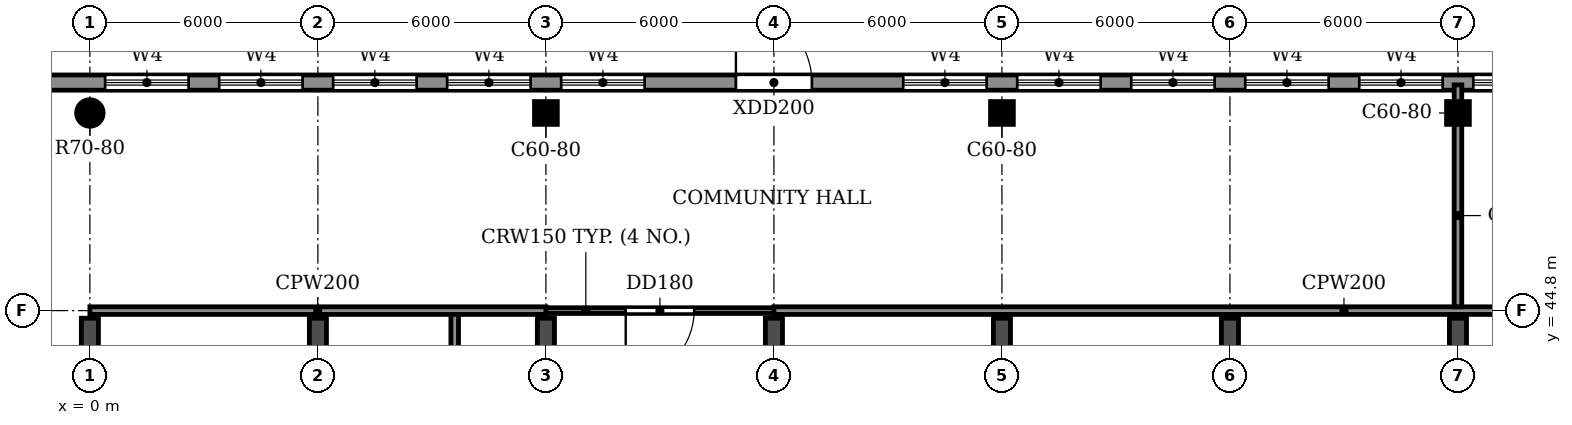
"""IFC4 building model, lengths in metres.
Left out: names, types, materials, properties, quantities, classifications, styles, units other than length and angle.
Written with IfcOpenShell. Run it as: python <this file> out.ifc"""

import sys

from ifc_helpers import new_model, si_unit, direction, frame, frame_2d, origin, origin_2d, place, context, subcontext, project, spatial, rectangle, circle, extrude, source, transform, mapped, element, fill, save


model = new_model("IFC4")
c1 = context("Model", 3, precision=1e-05, world=origin(), true_north=direction((0.0, 1.0)))
c2 = subcontext(c1, "Body", "Model", "MODEL_VIEW")
j1 = project(units=[si_unit("LENGTHUNIT", "METRE"), si_unit("PLANEANGLEUNIT", "RADIAN")], contexts=[c1])
p1 = place(None, origin())
s1 = spatial("IfcSite", under=j1, at=p1, CompositionType="ELEMENT")
p2 = place(p1, origin())
s2 = spatial("IfcBuilding", under=s1, at=p2, CompositionType="ELEMENT")
p3 = place(p2, frame((0.0, 0.0, 19.2)))
s3 = spatial("IfcBuildingStorey", under=s2, at=p3, CompositionType="ELEMENT", Elevation=19.2)
for number, where, z_axis, x_axis in (
    (1, (0.0, 30.55, 0.0), (0.0, 0.0, 1.0), (0.0, 1.0, 0.0)),
    (2, (6.0, 30.55, 0.0), (0.0, 0.0, 1.0), (0.0, 1.0, 0.0)),
    (3, (12.0, 30.55, 0.0), (0.0, 0.0, 1.0), (0.0, 1.0, 0.0)),
    (4, (18.0, 30.55, 0.0), (0.0, 0.0, 1.0), (0.0, 1.0, 0.0)),
    (5, (24.0, 30.55, 0.0), (0.0, 0.0, 1.0), (0.0, 1.0, 0.0)),
    (6, (30.0, 30.55, 0.0), (0.0, 0.0, 1.0), (0.0, 1.0, 0.0)),
    (7, (36.0, 30.55, 0.0), (0.0, 0.0, 1.0), (0.0, 1.0, 0.0)),
):
    element("IfcWall", number, at=place(p3, frame(where, z_axis=z_axis, x_axis=x_axis)), inside=s3, PredefinedType="SHEAR", context=c2, shape_type="SweptSolid", body=[
        extrude(rectangle(XDim=14.05, YDim=0.45, at=frame_2d((7.025, 0.0))), origin(), (0.0, 0.0, 1.0), 3.95),
    ])
m1 = source(origin(), c2, "Body", "SweptSolid", [
    extrude(circle(Radius=0.35, at=origin_2d()), origin(), (0.0, 0.0, 1.0), 3.95),
])
p4 = place(p3, frame((0.0, 50.0, 0.0), z_axis=(0.0, 0.0, 1.0), x_axis=(1.0, 0.0, 0.0)))
e8 = element("IfcColumn", 8, at=p4, inside=s3, PredefinedType="COLUMN", context=c2, shape_type="MappedRepresentation", body=[
    mapped(m1, transform((0.0, 0.0, 0.0))),
])
m2 = source(origin(), c2, "Body", "SweptSolid", [
    extrude(rectangle(XDim=0.6, YDim=0.6, at=origin_2d()), origin(), (0.0, 0.0, 1.0), 3.95),
])
for number, where, z_axis, x_axis in (
    (9, (12.0, 50.0, 0.0), (0.0, 0.0, 1.0), (1.0, 0.0, 0.0)),
    (10, (24.0, 50.0, 0.0), (0.0, 0.0, 1.0), (1.0, 0.0, 0.0)),
    (11, (36.0, 50.0, 0.0), (0.0, 0.0, 1.0), (1.0, 0.0, 0.0)),
):
    element("IfcColumn", number, at=place(p3, frame(where, z_axis=z_axis, x_axis=x_axis)), inside=s3, PredefinedType="COLUMN", context=c2, shape_type="MappedRepresentation", body=[
        mapped(m2, transform((0.0, 0.0, 0.0))),
    ])
p5 = place(p3, frame((105.0, 50.8, 0.0), z_axis=(0.0, 0.0, 1.0), x_axis=(-1.0, 0.0, 0.0)))
e12 = element("IfcWall", 12, at=p5, inside=s3, PredefinedType="STANDARD", context=c2, shape_type="SweptSolid", body=[
    extrude(rectangle(XDim=108.0, YDim=0.4, at=frame_2d((54.0, 0.0))), origin(), (0.0, 0.0, 1.0), 3.95),
])
p6 = place(p5, frame((102.4, 0.0, 0.9)))
e13 = element("IfcOpeningElement", 13, at=p6, cuts=e12, PredefinedType="OPENING", context=c2, shape_type="SweptSolid", body=[
    extrude(rectangle(XDim=2.2, YDim=2.7, at=frame_2d((1.1, 1.35))), frame((0.0, 0.21, 0.0), z_axis=(0.0, -1.0, 0.0), x_axis=(1.0, 0.0, 0.0)), (0.0, 0.0, 1.0), 0.42),
])
p7 = place(p5, frame((99.4, 0.0, 0.9)))
e14 = element("IfcOpeningElement", 14, at=p7, cuts=e12, PredefinedType="OPENING", context=c2, shape_type="SweptSolid", body=[
    extrude(rectangle(XDim=2.2, YDim=2.7, at=frame_2d((1.1, 1.35))), frame((0.0, 0.21, 0.0), z_axis=(0.0, -1.0, 0.0), x_axis=(1.0, 0.0, 0.0)), (0.0, 0.0, 1.0), 0.42),
])
p8 = place(p5, frame((96.4, 0.0, 0.9)))
e15 = element("IfcOpeningElement", 15, at=p8, cuts=e12, PredefinedType="OPENING", context=c2, shape_type="SweptSolid", body=[
    extrude(rectangle(XDim=2.2, YDim=2.7, at=frame_2d((1.1, 1.35))), frame((0.0, 0.21, 0.0), z_axis=(0.0, -1.0, 0.0), x_axis=(1.0, 0.0, 0.0)), (0.0, 0.0, 1.0), 0.42),
])
p9 = place(p5, frame((93.4, 0.0, 0.9)))
e16 = element("IfcOpeningElement", 16, at=p9, cuts=e12, PredefinedType="OPENING", context=c2, shape_type="SweptSolid", body=[
    extrude(rectangle(XDim=2.2, YDim=2.7, at=frame_2d((1.1, 1.35))), frame((0.0, 0.21, 0.0), z_axis=(0.0, -1.0, 0.0), x_axis=(1.0, 0.0, 0.0)), (0.0, 0.0, 1.0), 0.42),
])
p10 = place(p5, frame((90.4, 0.0, 0.9)))
e17 = element("IfcOpeningElement", 17, at=p10, cuts=e12, PredefinedType="OPENING", context=c2, shape_type="SweptSolid", body=[
    extrude(rectangle(XDim=2.2, YDim=2.7, at=frame_2d((1.1, 1.35))), frame((0.0, 0.21, 0.0), z_axis=(0.0, -1.0, 0.0), x_axis=(1.0, 0.0, 0.0)), (0.0, 0.0, 1.0), 0.42),
])
p11 = place(p5, frame((81.4, 0.0, 0.9)))
e18 = element("IfcOpeningElement", 18, at=p11, cuts=e12, PredefinedType="OPENING", context=c2, shape_type="SweptSolid", body=[
    extrude(rectangle(XDim=2.2, YDim=2.7, at=frame_2d((1.1, 1.35))), frame((0.0, 0.21, 0.0), z_axis=(0.0, -1.0, 0.0), x_axis=(1.0, 0.0, 0.0)), (0.0, 0.0, 1.0), 0.42),
])
p12 = place(p5, frame((78.4, 0.0, 0.9)))
e19 = element("IfcOpeningElement", 19, at=p12, cuts=e12, PredefinedType="OPENING", context=c2, shape_type="SweptSolid", body=[
    extrude(rectangle(XDim=2.2, YDim=2.7, at=frame_2d((1.1, 1.35))), frame((0.0, 0.21, 0.0), z_axis=(0.0, -1.0, 0.0), x_axis=(1.0, 0.0, 0.0)), (0.0, 0.0, 1.0), 0.42),
])
p13 = place(p5, frame((75.4, 0.0, 0.9)))
e20 = element("IfcOpeningElement", 20, at=p13, cuts=e12, PredefinedType="OPENING", context=c2, shape_type="SweptSolid", body=[
    extrude(rectangle(XDim=2.2, YDim=2.7, at=frame_2d((1.1, 1.35))), frame((0.0, 0.21, 0.0), z_axis=(0.0, -1.0, 0.0), x_axis=(1.0, 0.0, 0.0)), (0.0, 0.0, 1.0), 0.42),
])
p14 = place(p5, frame((72.4, 0.0, 0.9)))
e21 = element("IfcOpeningElement", 21, at=p14, cuts=e12, PredefinedType="OPENING", context=c2, shape_type="SweptSolid", body=[
    extrude(rectangle(XDim=2.2, YDim=2.7, at=frame_2d((1.1, 1.35))), frame((0.0, 0.21, 0.0), z_axis=(0.0, -1.0, 0.0), x_axis=(1.0, 0.0, 0.0)), (0.0, 0.0, 1.0), 0.42),
])
p15 = place(p5, frame((69.4, 0.0, 0.9)))
e22 = element("IfcOpeningElement", 22, at=p15, cuts=e12, PredefinedType="OPENING", context=c2, shape_type="SweptSolid", body=[
    extrude(rectangle(XDim=2.2, YDim=2.7, at=frame_2d((1.1, 1.35))), frame((0.0, 0.21, 0.0), z_axis=(0.0, -1.0, 0.0), x_axis=(1.0, 0.0, 0.0)), (0.0, 0.0, 1.0), 0.42),
])
p16 = place(p5, frame((66.4, 0.0, 0.9)))
e23 = element("IfcOpeningElement", 23, at=p16, cuts=e12, PredefinedType="OPENING", context=c2, shape_type="SweptSolid", body=[
    extrude(rectangle(XDim=2.2, YDim=2.7, at=frame_2d((1.1, 1.35))), frame((0.0, 0.21, 0.0), z_axis=(0.0, -1.0, 0.0), x_axis=(1.0, 0.0, 0.0)), (0.0, 0.0, 1.0), 0.42),
])
p17 = place(p5, frame((63.4, 0.0, 0.9)))
e24 = element("IfcOpeningElement", 24, at=p17, cuts=e12, PredefinedType="OPENING", context=c2, shape_type="SweptSolid", body=[
    extrude(rectangle(XDim=2.2, YDim=2.7, at=frame_2d((1.1, 1.35))), frame((0.0, 0.21, 0.0), z_axis=(0.0, -1.0, 0.0), x_axis=(1.0, 0.0, 0.0)), (0.0, 0.0, 1.0), 0.42),
])
p18 = place(p5, frame((60.4, 0.0, 0.9)))
e25 = element("IfcOpeningElement", 25, at=p18, cuts=e12, PredefinedType="OPENING", context=c2, shape_type="SweptSolid", body=[
    extrude(rectangle(XDim=2.2, YDim=2.7, at=frame_2d((1.1, 1.35))), frame((0.0, 0.21, 0.0), z_axis=(0.0, -1.0, 0.0), x_axis=(1.0, 0.0, 0.0)), (0.0, 0.0, 1.0), 0.42),
])
p19 = place(p5, frame((57.4, 0.0, 0.9)))
e26 = element("IfcOpeningElement", 26, at=p19, cuts=e12, PredefinedType="OPENING", context=c2, shape_type="SweptSolid", body=[
    extrude(rectangle(XDim=2.2, YDim=2.7, at=frame_2d((1.1, 1.35))), frame((0.0, 0.21, 0.0), z_axis=(0.0, -1.0, 0.0), x_axis=(1.0, 0.0, 0.0)), (0.0, 0.0, 1.0), 0.42),
])
p20 = place(p5, frame((48.4, 0.0, 0.9)))
e27 = element("IfcOpeningElement", 27, at=p20, cuts=e12, PredefinedType="OPENING", context=c2, shape_type="SweptSolid", body=[
    extrude(rectangle(XDim=2.2, YDim=2.7, at=frame_2d((1.1, 1.35))), frame((0.0, 0.21, 0.0), z_axis=(0.0, -1.0, 0.0), x_axis=(1.0, 0.0, 0.0)), (0.0, 0.0, 1.0), 0.42),
])
p21 = place(p5, frame((45.4, 0.0, 0.9)))
e28 = element("IfcOpeningElement", 28, at=p21, cuts=e12, PredefinedType="OPENING", context=c2, shape_type="SweptSolid", body=[
    extrude(rectangle(XDim=2.2, YDim=2.7, at=frame_2d((1.1, 1.35))), frame((0.0, 0.21, 0.0), z_axis=(0.0, -1.0, 0.0), x_axis=(1.0, 0.0, 0.0)), (0.0, 0.0, 1.0), 0.42),
])
p22 = place(p5, frame((42.4, 0.0, 0.9)))
e29 = element("IfcOpeningElement", 29, at=p22, cuts=e12, PredefinedType="OPENING", context=c2, shape_type="SweptSolid", body=[
    extrude(rectangle(XDim=2.2, YDim=2.7, at=frame_2d((1.1, 1.35))), frame((0.0, 0.21, 0.0), z_axis=(0.0, -1.0, 0.0), x_axis=(1.0, 0.0, 0.0)), (0.0, 0.0, 1.0), 0.42),
])
p23 = place(p5, frame((39.4, 0.0, 0.9)))
e30 = element("IfcOpeningElement", 30, at=p23, cuts=e12, PredefinedType="OPENING", context=c2, shape_type="SweptSolid", body=[
    extrude(rectangle(XDim=2.2, YDim=2.7, at=frame_2d((1.1, 1.35))), frame((0.0, 0.21, 0.0), z_axis=(0.0, -1.0, 0.0), x_axis=(1.0, 0.0, 0.0)), (0.0, 0.0, 1.0), 0.42),
])
p24 = place(p5, frame((36.4, 0.0, 0.9)))
e31 = element("IfcOpeningElement", 31, at=p24, cuts=e12, PredefinedType="OPENING", context=c2, shape_type="SweptSolid", body=[
    extrude(rectangle(XDim=2.2, YDim=2.7, at=frame_2d((1.1, 1.35))), frame((0.0, 0.21, 0.0), z_axis=(0.0, -1.0, 0.0), x_axis=(1.0, 0.0, 0.0)), (0.0, 0.0, 1.0), 0.42),
])
p25 = place(p5, frame((33.4, 0.0, 0.9)))
e32 = element("IfcOpeningElement", 32, at=p25, cuts=e12, PredefinedType="OPENING", context=c2, shape_type="SweptSolid", body=[
    extrude(rectangle(XDim=2.2, YDim=2.7, at=frame_2d((1.1, 1.35))), frame((0.0, 0.21, 0.0), z_axis=(0.0, -1.0, 0.0), x_axis=(1.0, 0.0, 0.0)), (0.0, 0.0, 1.0), 0.42),
])
p26 = place(p5, frame((24.4, 0.0, 0.9)))
e33 = element("IfcOpeningElement", 33, at=p26, cuts=e12, PredefinedType="OPENING", context=c2, shape_type="SweptSolid", body=[
    extrude(rectangle(XDim=2.2, YDim=2.7, at=frame_2d((1.1, 1.35))), frame((0.0, 0.21, 0.0), z_axis=(0.0, -1.0, 0.0), x_axis=(1.0, 0.0, 0.0)), (0.0, 0.0, 1.0), 0.42),
])
p27 = place(p5, frame((21.4, 0.0, 0.9)))
e34 = element("IfcOpeningElement", 34, at=p27, cuts=e12, PredefinedType="OPENING", context=c2, shape_type="SweptSolid", body=[
    extrude(rectangle(XDim=2.2, YDim=2.7, at=frame_2d((1.1, 1.35))), frame((0.0, 0.21, 0.0), z_axis=(0.0, -1.0, 0.0), x_axis=(1.0, 0.0, 0.0)), (0.0, 0.0, 1.0), 0.42),
])
p28 = place(p5, frame((18.4, 0.0, 0.9)))
e35 = element("IfcOpeningElement", 35, at=p28, cuts=e12, PredefinedType="OPENING", context=c2, shape_type="SweptSolid", body=[
    extrude(rectangle(XDim=2.2, YDim=2.7, at=frame_2d((1.1, 1.35))), frame((0.0, 0.21, 0.0), z_axis=(0.0, -1.0, 0.0), x_axis=(1.0, 0.0, 0.0)), (0.0, 0.0, 1.0), 0.42),
])
p29 = place(p5, frame((15.4, 0.0, 0.9)))
e36 = element("IfcOpeningElement", 36, at=p29, cuts=e12, PredefinedType="OPENING", context=c2, shape_type="SweptSolid", body=[
    extrude(rectangle(XDim=2.2, YDim=2.7, at=frame_2d((1.1, 1.35))), frame((0.0, 0.21, 0.0), z_axis=(0.0, -1.0, 0.0), x_axis=(1.0, 0.0, 0.0)), (0.0, 0.0, 1.0), 0.42),
])
p30 = place(p5, frame((12.4, 0.0, 0.9)))
e37 = element("IfcOpeningElement", 37, at=p30, cuts=e12, PredefinedType="OPENING", context=c2, shape_type="SweptSolid", body=[
    extrude(rectangle(XDim=2.2, YDim=2.7, at=frame_2d((1.1, 1.35))), frame((0.0, 0.21, 0.0), z_axis=(0.0, -1.0, 0.0), x_axis=(1.0, 0.0, 0.0)), (0.0, 0.0, 1.0), 0.42),
])
p31 = place(p5, frame((9.4, 0.0, 0.9)))
e38 = element("IfcOpeningElement", 38, at=p31, cuts=e12, PredefinedType="OPENING", context=c2, shape_type="SweptSolid", body=[
    extrude(rectangle(XDim=2.2, YDim=2.7, at=frame_2d((1.1, 1.35))), frame((0.0, 0.21, 0.0), z_axis=(0.0, -1.0, 0.0), x_axis=(1.0, 0.0, 0.0)), (0.0, 0.0, 1.0), 0.42),
])
p32 = place(p5, frame((6.4, 0.0, 0.9)))
e39 = element("IfcOpeningElement", 39, at=p32, cuts=e12, PredefinedType="OPENING", context=c2, shape_type="SweptSolid", body=[
    extrude(rectangle(XDim=2.2, YDim=2.7, at=frame_2d((1.1, 1.35))), frame((0.0, 0.21, 0.0), z_axis=(0.0, -1.0, 0.0), x_axis=(1.0, 0.0, 0.0)), (0.0, 0.0, 1.0), 0.42),
])
p33 = place(p5, frame((3.4, 0.0, 0.9)))
e40 = element("IfcOpeningElement", 40, at=p33, cuts=e12, PredefinedType="OPENING", context=c2, shape_type="SweptSolid", body=[
    extrude(rectangle(XDim=2.2, YDim=2.7, at=frame_2d((1.1, 1.35))), frame((0.0, 0.21, 0.0), z_axis=(0.0, -1.0, 0.0), x_axis=(1.0, 0.0, 0.0)), (0.0, 0.0, 1.0), 0.42),
])
p34 = place(p5, frame((86.0, 0.0, 0.0)))
e41 = element("IfcOpeningElement", 41, at=p34, cuts=e12, PredefinedType="OPENING", context=c2, shape_type="SweptSolid", body=[
    extrude(rectangle(XDim=2.0, YDim=2.4, at=frame_2d((1.0, 1.2))), frame((0.0, 0.21, 0.0), z_axis=(0.0, -1.0, 0.0), x_axis=(1.0, 0.0, 0.0)), (0.0, 0.0, 1.0), 0.42),
])
p35 = place(p5, frame((53.0, 0.0, 0.0)))
e42 = element("IfcOpeningElement", 42, at=p35, cuts=e12, PredefinedType="OPENING", context=c2, shape_type="SweptSolid", body=[
    extrude(rectangle(XDim=2.0, YDim=2.4, at=frame_2d((1.0, 1.2))), frame((0.0, 0.21, 0.0), z_axis=(0.0, -1.0, 0.0), x_axis=(1.0, 0.0, 0.0)), (0.0, 0.0, 1.0), 0.42),
])
p36 = place(p5, frame((29.0, 0.0, 0.0)))
e43 = element("IfcOpeningElement", 43, at=p36, cuts=e12, PredefinedType="OPENING", context=c2, shape_type="SweptSolid", body=[
    extrude(rectangle(XDim=2.0, YDim=2.4, at=frame_2d((1.0, 1.2))), frame((0.0, 0.21, 0.0), z_axis=(0.0, -1.0, 0.0), x_axis=(1.0, 0.0, 0.0)), (0.0, 0.0, 1.0), 0.42),
])
p37 = place(p3, frame((12.0, 44.8, 0.0), z_axis=(0.0, 0.0, 1.0), x_axis=(1.0, 0.0, 0.0)))
e44 = element("IfcWall", 44, at=p37, inside=s3, PredefinedType="PARTITIONING", context=c2, shape_type="SweptSolid", body=[
    extrude(rectangle(XDim=6.0, YDim=0.15, at=frame_2d((3.0, 0.0))), origin(), (0.0, 0.0, 1.0), 3.95),
])
p38 = place(p37, frame((2.1, 0.0, 0.0)))
e45 = element("IfcOpeningElement", 45, at=p38, cuts=e44, PredefinedType="OPENING", context=c2, shape_type="SweptSolid", body=[
    extrude(rectangle(XDim=1.8, YDim=2.1, at=frame_2d((0.9, 1.05))), frame((0.0, 0.085, 0.0), z_axis=(0.0, -1.0, 0.0), x_axis=(1.0, 0.0, 0.0)), (0.0, 0.0, 1.0), 0.17),
])
p39 = place(p3, frame((0.0, 44.8, 0.0), z_axis=(0.0, 0.0, 1.0), x_axis=(1.0, 0.0, 0.0)))
e46 = element("IfcWall", 46, at=p39, inside=s3, PredefinedType="PARTITIONING", context=c2, shape_type="SweptSolid", body=[
    extrude(rectangle(XDim=12.0, YDim=0.2, at=frame_2d((6.0, 0.0))), origin(), (0.0, 0.0, 1.0), 3.95),
])
p40 = place(p3, frame((18.0, 44.8, 0.0), z_axis=(0.0, 0.0, 1.0), x_axis=(1.0, 0.0, 0.0)))
e47 = element("IfcWall", 47, at=p40, inside=s3, PredefinedType="PARTITIONING", context=c2, shape_type="SweptSolid", body=[
    extrude(rectangle(XDim=30.0, YDim=0.2, at=frame_2d((15.0, 0.0))), origin(), (0.0, 0.0, 1.0), 3.95),
])
p41 = place(p3, frame((9.6, 32.875, 0.0), z_axis=(0.0, 0.0, 1.0), x_axis=(0.0, 1.0, 0.0)))
e48 = element("IfcWall", 48, at=p41, inside=s3, PredefinedType="PARTITIONING", context=c2, shape_type="SweptSolid", body=[
    extrude(rectangle(XDim=11.825, YDim=0.2, at=frame_2d((5.913, 0.0))), origin(), (0.0, 0.0, 1.0), 3.95),
])
p42 = place(p3, frame((36.0, 44.9, 0.0), z_axis=(0.0, 0.0, 1.0), x_axis=(0.0, 1.0, 0.0)))
e49 = element("IfcWall", 49, at=p42, inside=s3, PredefinedType="PARTITIONING", context=c2, shape_type="SweptSolid", body=[
    extrude(rectangle(XDim=5.84, YDim=0.2, at=frame_2d((2.92, 0.0))), origin(), (0.0, 0.0, 1.0), 3.95),
])
p43 = place(p6, origin())
e50 = element("IfcWindow", 50, at=p43, inside=s3, PartitioningType="DOUBLE_PANEL_HORIZONTAL", PredefinedType="WINDOW", context=c2, shape_type="SweptSolid", body=[
    extrude(rectangle(XDim=2.2, YDim=2.7, at=frame_2d((1.1, 1.35))), frame((0.0, 0.03, 0.0), z_axis=(0.0, -1.0, 0.0), x_axis=(1.0, 0.0, 0.0)), (0.0, 0.0, 1.0), 0.06),
])
fill(e13, e50)
p44 = place(p7, origin())
e51 = element("IfcWindow", 51, at=p44, inside=s3, PartitioningType="DOUBLE_PANEL_HORIZONTAL", PredefinedType="WINDOW", context=c2, shape_type="SweptSolid", body=[
    extrude(rectangle(XDim=2.2, YDim=2.7, at=frame_2d((1.1, 1.35))), frame((0.0, 0.03, 0.0), z_axis=(0.0, -1.0, 0.0), x_axis=(1.0, 0.0, 0.0)), (0.0, 0.0, 1.0), 0.06),
])
fill(e14, e51)
p45 = place(p8, origin())
e52 = element("IfcWindow", 52, at=p45, inside=s3, PartitioningType="DOUBLE_PANEL_HORIZONTAL", PredefinedType="WINDOW", context=c2, shape_type="SweptSolid", body=[
    extrude(rectangle(XDim=2.2, YDim=2.7, at=frame_2d((1.1, 1.35))), frame((0.0, 0.03, 0.0), z_axis=(0.0, -1.0, 0.0), x_axis=(1.0, 0.0, 0.0)), (0.0, 0.0, 1.0), 0.06),
])
fill(e15, e52)
p46 = place(p9, origin())
e53 = element("IfcWindow", 53, at=p46, inside=s3, PartitioningType="DOUBLE_PANEL_HORIZONTAL", PredefinedType="WINDOW", context=c2, shape_type="SweptSolid", body=[
    extrude(rectangle(XDim=2.2, YDim=2.7, at=frame_2d((1.1, 1.35))), frame((0.0, 0.03, 0.0), z_axis=(0.0, -1.0, 0.0), x_axis=(1.0, 0.0, 0.0)), (0.0, 0.0, 1.0), 0.06),
])
fill(e16, e53)
p47 = place(p10, origin())
e54 = element("IfcWindow", 54, at=p47, inside=s3, PartitioningType="DOUBLE_PANEL_HORIZONTAL", PredefinedType="WINDOW", context=c2, shape_type="SweptSolid", body=[
    extrude(rectangle(XDim=2.2, YDim=2.7, at=frame_2d((1.1, 1.35))), frame((0.0, 0.03, 0.0), z_axis=(0.0, -1.0, 0.0), x_axis=(1.0, 0.0, 0.0)), (0.0, 0.0, 1.0), 0.06),
])
fill(e17, e54)
p48 = place(p11, origin())
e55 = element("IfcWindow", 55, at=p48, inside=s3, PartitioningType="DOUBLE_PANEL_HORIZONTAL", PredefinedType="WINDOW", context=c2, shape_type="SweptSolid", body=[
    extrude(rectangle(XDim=2.2, YDim=2.7, at=frame_2d((1.1, 1.35))), frame((0.0, 0.03, 0.0), z_axis=(0.0, -1.0, 0.0), x_axis=(1.0, 0.0, 0.0)), (0.0, 0.0, 1.0), 0.06),
])
fill(e18, e55)
p49 = place(p12, origin())
e56 = element("IfcWindow", 56, at=p49, inside=s3, PartitioningType="DOUBLE_PANEL_HORIZONTAL", PredefinedType="WINDOW", context=c2, shape_type="SweptSolid", body=[
    extrude(rectangle(XDim=2.2, YDim=2.7, at=frame_2d((1.1, 1.35))), frame((0.0, 0.03, 0.0), z_axis=(0.0, -1.0, 0.0), x_axis=(1.0, 0.0, 0.0)), (0.0, 0.0, 1.0), 0.06),
])
fill(e19, e56)
p50 = place(p13, origin())
e57 = element("IfcWindow", 57, at=p50, inside=s3, PartitioningType="DOUBLE_PANEL_HORIZONTAL", PredefinedType="WINDOW", context=c2, shape_type="SweptSolid", body=[
    extrude(rectangle(XDim=2.2, YDim=2.7, at=frame_2d((1.1, 1.35))), frame((0.0, 0.03, 0.0), z_axis=(0.0, -1.0, 0.0), x_axis=(1.0, 0.0, 0.0)), (0.0, 0.0, 1.0), 0.06),
])
fill(e20, e57)
p51 = place(p14, origin())
e58 = element("IfcWindow", 58, at=p51, inside=s3, PartitioningType="DOUBLE_PANEL_HORIZONTAL", PredefinedType="WINDOW", context=c2, shape_type="SweptSolid", body=[
    extrude(rectangle(XDim=2.2, YDim=2.7, at=frame_2d((1.1, 1.35))), frame((0.0, 0.03, 0.0), z_axis=(0.0, -1.0, 0.0), x_axis=(1.0, 0.0, 0.0)), (0.0, 0.0, 1.0), 0.06),
])
fill(e21, e58)
p52 = place(p15, origin())
e59 = element("IfcWindow", 59, at=p52, inside=s3, PartitioningType="DOUBLE_PANEL_HORIZONTAL", PredefinedType="WINDOW", context=c2, shape_type="SweptSolid", body=[
    extrude(rectangle(XDim=2.2, YDim=2.7, at=frame_2d((1.1, 1.35))), frame((0.0, 0.03, 0.0), z_axis=(0.0, -1.0, 0.0), x_axis=(1.0, 0.0, 0.0)), (0.0, 0.0, 1.0), 0.06),
])
fill(e22, e59)
p53 = place(p16, origin())
e60 = element("IfcWindow", 60, at=p53, inside=s3, PartitioningType="DOUBLE_PANEL_HORIZONTAL", PredefinedType="WINDOW", context=c2, shape_type="SweptSolid", body=[
    extrude(rectangle(XDim=2.2, YDim=2.7, at=frame_2d((1.1, 1.35))), frame((0.0, 0.03, 0.0), z_axis=(0.0, -1.0, 0.0), x_axis=(1.0, 0.0, 0.0)), (0.0, 0.0, 1.0), 0.06),
])
fill(e23, e60)
p54 = place(p38, frame((1.8, 0.0, 0.0), z_axis=(0.0, 0.0, 1.0), x_axis=(-1.0, 0.0, 0.0)))
e61 = element("IfcDoor", 61, at=p54, inside=s3, OperationType="DOUBLE_DOOR_SINGLE_SWING", PredefinedType="DOOR", context=c2, shape_type="SweptSolid", body=[
    extrude(rectangle(XDim=1.8, YDim=2.1, at=frame_2d((0.9, 1.05))), frame((0.0, 0.025, 0.0), z_axis=(0.0, -1.0, 0.0), x_axis=(1.0, 0.0, 0.0)), (0.0, 0.0, 1.0), 0.05),
])
fill(e45, e61)
p55 = place(p34, frame((2.0, 0.0, 0.0), z_axis=(0.0, 0.0, 1.0), x_axis=(-1.0, 0.0, 0.0)))
e62 = element("IfcDoor", 62, at=p55, inside=s3, OperationType="DOUBLE_DOOR_SINGLE_SWING", PredefinedType="DOOR", context=c2, shape_type="SweptSolid", body=[
    extrude(rectangle(XDim=2.0, YDim=2.4, at=frame_2d((1.0, 1.2))), frame((0.0, 0.025, 0.0), z_axis=(0.0, -1.0, 0.0), x_axis=(1.0, 0.0, 0.0)), (0.0, 0.0, 1.0), 0.05),
])
fill(e41, e62)
save(model, sys.argv[1])
